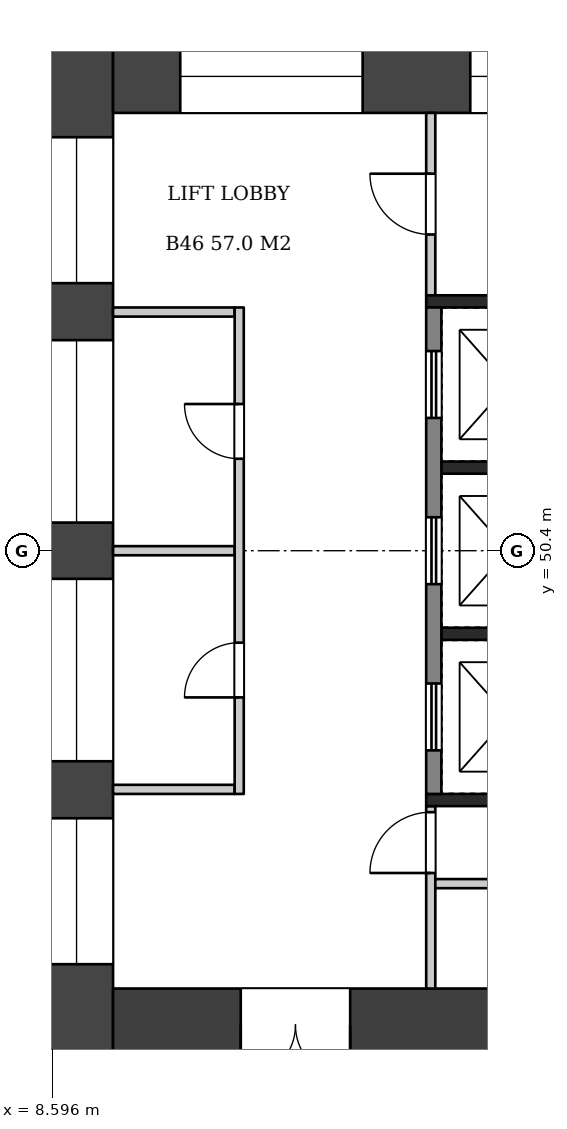
"""IFC4 building model, lengths in metres.
Left out: names, types, materials, properties, quantities, classifications, styles, units other than length and angle.
Written with IfcOpenShell. Run it as: python <this file> out.ifc"""

import sys

from ifc_helpers import new_model, si_unit, direction, frame, frame_2d, origin, place, context, subcontext, project, spatial, rectangle, extrude, element, fill, save


model = new_model("IFC4")
c1 = context("Model", 3, precision=1e-05, world=origin(), true_north=direction((0.0, 1.0)))
c2 = subcontext(c1, "Body", "Model", "MODEL_VIEW")
j1 = project(units=[si_unit("LENGTHUNIT", "METRE"), si_unit("PLANEANGLEUNIT", "RADIAN")], contexts=[c1])
p1 = place(None, origin())
s1 = spatial("IfcSite", under=j1, at=p1, CompositionType="ELEMENT")
p2 = place(p1, origin())
s2 = spatial("IfcBuilding", under=s1, at=p2, CompositionType="ELEMENT")
p3 = place(p2, frame((0.0, 0.0, 179.2)))
s3 = spatial("IfcBuildingStorey", under=s2, at=p3, CompositionType="ELEMENT", Elevation=179.2)
p4 = place(p3, frame((9.0, 58.8, 0.0), z_axis=(0.0, 0.0, 1.0), x_axis=(0.0, -1.0, 0.0)))
e1 = element("IfcWall", 1, at=p4, inside=s3, PredefinedType="SHEAR", context=c2, shape_type="SweptSolid", body=[
    extrude(rectangle(XDim=16.8, YDim=1.2, at=frame_2d((8.4, 0.0))), origin(), (0.0, 0.0, 1.0), 3.22),
])
p5 = place(p4, frame((1.6, 0.0, 0.6)))
e2 = element("IfcOpeningElement", 2, at=p5, cuts=e1, PredefinedType="OPENING", context=c2, shape_type="SweptSolid", body=[
    extrude(rectangle(XDim=2.4, YDim=2.1, at=frame_2d((1.2, 1.05))), frame((0.0, 0.61, 0.0), z_axis=(0.0, -1.0, 0.0), x_axis=(1.0, 0.0, 0.0)), (0.0, 0.0, 1.0), 1.22),
])
p6 = place(p4, frame((4.938, 0.0, 1.6)))
e3 = element("IfcOpeningElement", 3, at=p6, cuts=e1, PredefinedType="OPENING", context=c2, shape_type="SweptSolid", body=[
    extrude(rectangle(XDim=3.0, YDim=1.2, at=frame_2d((1.5, 0.6))), frame((0.0, 0.61, 0.0), z_axis=(0.0, -1.0, 0.0), x_axis=(1.0, 0.0, 0.0)), (0.0, 0.0, 1.0), 1.22),
])
p7 = place(p4, frame((8.863, 0.0, 1.6)))
e4 = element("IfcOpeningElement", 4, at=p7, cuts=e1, PredefinedType="OPENING", context=c2, shape_type="SweptSolid", body=[
    extrude(rectangle(XDim=3.0, YDim=1.2, at=frame_2d((1.5, 0.6))), frame((0.0, 0.61, 0.0), z_axis=(0.0, -1.0, 0.0), x_axis=(1.0, 0.0, 0.0)), (0.0, 0.0, 1.0), 1.22),
])
p8 = place(p4, frame((12.8, 0.0, 0.6)))
e5 = element("IfcOpeningElement", 5, at=p8, cuts=e1, PredefinedType="OPENING", context=c2, shape_type="SweptSolid", body=[
    extrude(rectangle(XDim=2.4, YDim=2.1, at=frame_2d((1.2, 1.05))), frame((0.0, 0.61, 0.0), z_axis=(0.0, -1.0, 0.0), x_axis=(1.0, 0.0, 0.0)), (0.0, 0.0, 1.0), 1.22),
])
p9 = place(p3, frame((9.6, 58.2, 0.0), z_axis=(0.0, 0.0, 1.0), x_axis=(1.0, 0.0, 0.0)))
e6 = element("IfcWall", 6, at=p9, inside=s3, PredefinedType="SHEAR", context=c2, shape_type="SweptSolid", body=[
    extrude(rectangle(XDim=14.4, YDim=1.2, at=frame_2d((7.2, 0.0))), origin(), (0.0, 0.0, 1.0), 3.22),
])
p10 = place(p9, frame((1.105, 0.0, 0.6)))
e7 = element("IfcOpeningElement", 7, at=p10, cuts=e6, PredefinedType="OPENING", context=c2, shape_type="SweptSolid", body=[
    extrude(rectangle(XDim=3.0, YDim=2.1, at=frame_2d((1.5, 1.05))), frame((0.0, 0.61, 0.0), z_axis=(0.0, -1.0, 0.0), x_axis=(1.0, 0.0, 0.0)), (0.0, 0.0, 1.0), 1.22),
])
p11 = place(p9, frame((5.875, 0.0, 0.6)))
e8 = element("IfcOpeningElement", 8, at=p11, cuts=e6, PredefinedType="OPENING", context=c2, shape_type="SweptSolid", body=[
    extrude(rectangle(XDim=2.4, YDim=2.1, at=frame_2d((1.2, 1.05))), frame((0.0, 0.61, 0.0), z_axis=(0.0, -1.0, 0.0), x_axis=(1.0, 0.0, 0.0)), (0.0, 0.0, 1.0), 1.22),
])
p12 = place(p9, frame((9.993, 0.0, 0.5)))
e9 = element("IfcOpeningElement", 9, at=p12, cuts=e6, PredefinedType="OPENING", context=c2, shape_type="SweptSolid", body=[
    extrude(rectangle(XDim=1.2, YDim=2.4, at=frame_2d((0.6, 1.2))), frame((0.0, 0.61, 0.0), z_axis=(0.0, -1.0, 0.0), x_axis=(1.0, 0.0, 0.0)), (0.0, 0.0, 1.0), 1.22),
])
p13 = place(p9, frame((12.197, 0.0, 0.5)))
e10 = element("IfcOpeningElement", 10, at=p13, cuts=e6, PredefinedType="OPENING", context=c2, shape_type="SweptSolid", body=[
    extrude(rectangle(XDim=1.2, YDim=2.4, at=frame_2d((0.6, 1.2))), frame((0.0, 0.61, 0.0), z_axis=(0.0, -1.0, 0.0), x_axis=(1.0, 0.0, 0.0)), (0.0, 0.0, 1.0), 1.22),
])
p14 = place(p3, frame((9.6, 42.6, 0.0), z_axis=(0.0, 0.0, 1.0), x_axis=(1.0, 0.0, 0.0)))
e11 = element("IfcWall", 11, at=p14, inside=s3, PredefinedType="SHEAR", context=c2, shape_type="SweptSolid", body=[
    extrude(rectangle(XDim=14.4, YDim=1.2, at=frame_2d((7.2, 0.0))), origin(), (0.0, 0.0, 1.0), 3.22),
])
p15 = place(p14, frame((2.1, 0.0, 0.0)))
e12 = element("IfcOpeningElement", 12, at=p15, cuts=e11, PredefinedType="OPENING", context=c2, shape_type="SweptSolid", body=[
    extrude(rectangle(XDim=1.8, YDim=2.1, at=frame_2d((0.9, 1.05))), frame((0.0, 0.61, 0.0), z_axis=(0.0, -1.0, 0.0), x_axis=(1.0, 0.0, 0.0)), (0.0, 0.0, 1.0), 1.22),
])
for number, where, z_axis, x_axis in (
    (13, (9.6, 54.325, 0.0), (0.0, 0.0, 1.0), (1.0, 0.0, 0.0)),
    (14, (9.6, 46.475, 0.0), (0.0, 0.0, 1.0), (1.0, 0.0, 0.0)),
    (15, (9.6, 50.4, 0.0), (0.0, 0.0, 1.0), (1.0, 0.0, 0.0)),
):
    element("IfcWall", number, at=place(p3, frame(where, z_axis=z_axis, x_axis=x_axis)), inside=s3, PredefinedType="PARTITIONING", context=c2, shape_type="SweptSolid", body=[
        extrude(rectangle(XDim=2.0, YDim=0.15, at=frame_2d((1.0, 0.0))), origin(), (0.0, 0.0, 1.0), 3.22),
    ])
p16 = place(p3, frame((11.675, 54.4, 0.0), z_axis=(0.0, 0.0, 1.0), x_axis=(0.0, -1.0, 0.0)))
e16 = element("IfcWall", 16, at=p16, inside=s3, PredefinedType="PARTITIONING", context=c2, shape_type="SweptSolid", body=[
    extrude(rectangle(XDim=8.0, YDim=0.15, at=frame_2d((4.0, 0.0))), origin(), (0.0, 0.0, 1.0), 3.22),
])
p17 = place(p16, frame((1.587, 0.0, 0.0)))
e17 = element("IfcOpeningElement", 17, at=p17, cuts=e16, PredefinedType="OPENING", context=c2, shape_type="SweptSolid", body=[
    extrude(rectangle(XDim=0.9, YDim=2.1, at=frame_2d((0.45, 1.05))), frame((0.0, 0.085, 0.0), z_axis=(0.0, -1.0, 0.0), x_axis=(1.0, 0.0, 0.0)), (0.0, 0.0, 1.0), 0.17),
])
p18 = place(p16, frame((5.512, 0.0, 0.0)))
e18 = element("IfcOpeningElement", 18, at=p18, cuts=e16, PredefinedType="OPENING", context=c2, shape_type="SweptSolid", body=[
    extrude(rectangle(XDim=0.9, YDim=2.1, at=frame_2d((0.45, 1.05))), frame((0.0, 0.085, 0.0), z_axis=(0.0, -1.0, 0.0), x_axis=(1.0, 0.0, 0.0)), (0.0, 0.0, 1.0), 0.17),
])
for number, where, z_axis, x_axis in (
    (19, (15.0, 51.767, 0.0), (0.0, 0.0, 1.0), (1.0, 0.0, 0.0)),
    (20, (15.0, 49.033, 0.0), (0.0, 0.0, 1.0), (1.0, 0.0, 0.0)),
):
    element("IfcWall", number, at=place(p3, frame(where, z_axis=z_axis, x_axis=x_axis)), inside=s3, PredefinedType="SHEAR", context=c2, shape_type="SweptSolid", body=[
        extrude(rectangle(XDim=1.9, YDim=0.2, at=frame_2d((0.95, 0.0))), origin(), (0.0, 0.0, 1.0), 3.22),
    ])
p19 = place(p3, frame((14.875, 54.4, 0.0), z_axis=(0.0, 0.0, 1.0), x_axis=(0.0, -1.0, 0.0)))
e21 = element("IfcWall", 21, at=p19, inside=s3, PredefinedType="SHEAR", context=c2, shape_type="SweptSolid", body=[
    extrude(rectangle(XDim=8.0, YDim=0.25, at=frame_2d((4.0, 0.0))), origin(), (0.0, 0.0, 1.0), 3.22),
])
p20 = place(p19, frame((0.717, 0.0, 0.0)))
e22 = element("IfcOpeningElement", 22, at=p20, cuts=e21, PredefinedType="OPENING", context=c2, shape_type="SweptSolid", body=[
    extrude(rectangle(XDim=1.1, YDim=2.1, at=frame_2d((0.55, 1.05))), frame((0.0, 0.135, 0.0), z_axis=(0.0, -1.0, 0.0), x_axis=(1.0, 0.0, 0.0)), (0.0, 0.0, 1.0), 0.27),
])
p21 = place(p19, frame((3.45, 0.0, 0.0)))
e23 = element("IfcOpeningElement", 23, at=p21, cuts=e21, PredefinedType="OPENING", context=c2, shape_type="SweptSolid", body=[
    extrude(rectangle(XDim=1.1, YDim=2.1, at=frame_2d((0.55, 1.05))), frame((0.0, 0.135, 0.0), z_axis=(0.0, -1.0, 0.0), x_axis=(1.0, 0.0, 0.0)), (0.0, 0.0, 1.0), 0.27),
])
p22 = place(p19, frame((6.183, 0.0, 0.0)))
e24 = element("IfcOpeningElement", 24, at=p22, cuts=e21, PredefinedType="OPENING", context=c2, shape_type="SweptSolid", body=[
    extrude(rectangle(XDim=1.1, YDim=2.1, at=frame_2d((0.55, 1.05))), frame((0.0, 0.135, 0.0), z_axis=(0.0, -1.0, 0.0), x_axis=(1.0, 0.0, 0.0)), (0.0, 0.0, 1.0), 0.27),
])
p23 = place(p3, frame((14.75, 54.5, 0.0), z_axis=(0.0, 0.0, 1.0), x_axis=(1.0, 0.0, 0.0)))
e25 = element("IfcWall", 25, at=p23, inside=s3, PredefinedType="SHEAR", context=c2, shape_type="SweptSolid", body=[
    extrude(rectangle(XDim=2.4, YDim=0.2, at=frame_2d((1.2, 0.0))), origin(), (0.0, 0.0, 1.0), 3.22),
])
p24 = place(p3, frame((14.825, 57.6, 0.0), z_axis=(0.0, 0.0, 1.0), x_axis=(0.0, -1.0, 0.0)))
e26 = element("IfcWall", 26, at=p24, inside=s3, PredefinedType="PARTITIONING", context=c2, shape_type="SweptSolid", body=[
    extrude(rectangle(XDim=3.0, YDim=0.15, at=frame_2d((1.5, 0.0))), origin(), (0.0, 0.0, 1.0), 3.22),
])
p25 = place(p24, frame((1.0, 0.0, 0.0)))
e27 = element("IfcOpeningElement", 27, at=p25, cuts=e26, PredefinedType="OPENING", context=c2, shape_type="SweptSolid", body=[
    extrude(rectangle(XDim=1.0, YDim=2.1, at=frame_2d((0.5, 1.05))), frame((0.0, 0.085, 0.0), z_axis=(0.0, -1.0, 0.0), x_axis=(1.0, 0.0, 0.0)), (0.0, 0.0, 1.0), 0.17),
])
p26 = place(p3, frame((14.75, 46.3, 0.0), z_axis=(0.0, 0.0, 1.0), x_axis=(1.0, 0.0, 0.0)))
e28 = element("IfcWall", 28, at=p26, inside=s3, PredefinedType="SHEAR", context=c2, shape_type="SweptSolid", body=[
    extrude(rectangle(XDim=9.25, YDim=0.2, at=frame_2d((4.625, 0.0))), origin(), (0.0, 0.0, 1.0), 3.22),
])
p27 = place(p3, frame((14.825, 46.2, 0.0), z_axis=(0.0, 0.0, 1.0), x_axis=(0.0, -1.0, 0.0)))
e29 = element("IfcWall", 29, at=p27, inside=s3, PredefinedType="PARTITIONING", context=c2, shape_type="SweptSolid", body=[
    extrude(rectangle(XDim=3.0, YDim=0.15, at=frame_2d((1.5, 0.0))), origin(), (0.0, 0.0, 1.0), 3.22),
])
p28 = place(p27, frame((0.1, 0.0, 0.0)))
e30 = element("IfcOpeningElement", 30, at=p28, cuts=e29, PredefinedType="OPENING", context=c2, shape_type="SweptSolid", body=[
    extrude(rectangle(XDim=1.0, YDim=2.1, at=frame_2d((0.5, 1.05))), frame((0.0, 0.085, 0.0), z_axis=(0.0, -1.0, 0.0), x_axis=(1.0, 0.0, 0.0)), (0.0, 0.0, 1.0), 0.17),
])
p29 = place(p3, frame((14.9, 44.925, 0.0), z_axis=(0.0, 0.0, 1.0), x_axis=(1.0, 0.0, 0.0)))
e31 = element("IfcWall", 31, at=p29, inside=s3, PredefinedType="PARTITIONING", context=c2, shape_type="SweptSolid", body=[
    extrude(rectangle(XDim=9.1, YDim=0.15, at=frame_2d((4.55, 0.0))), origin(), (0.0, 0.0, 1.0), 3.22),
])
p30 = place(p29, frame((1.738, 0.0, 0.0)))
e32 = element("IfcOpeningElement", 32, at=p30, cuts=e31, PredefinedType="OPENING", context=c2, shape_type="SweptSolid", body=[
    extrude(rectangle(XDim=1.0, YDim=2.1, at=frame_2d((0.5, 1.05))), frame((0.0, 0.085, 0.0), z_axis=(0.0, -1.0, 0.0), x_axis=(1.0, 0.0, 0.0)), (0.0, 0.0, 1.0), 0.17),
])
p31 = place(p29, frame((6.413, 0.0, 0.0)))
e33 = element("IfcOpeningElement", 33, at=p31, cuts=e31, PredefinedType="OPENING", context=c2, shape_type="SweptSolid", body=[
    extrude(rectangle(XDim=0.9, YDim=2.1, at=frame_2d((0.45, 1.05))), frame((0.0, 0.085, 0.0), z_axis=(0.0, -1.0, 0.0), x_axis=(1.0, 0.0, 0.0)), (0.0, 0.0, 1.0), 0.17),
])
p32 = place(p15, frame((1.8, 0.0, 0.0), z_axis=(0.0, 0.0, 1.0), x_axis=(-1.0, 0.0, 0.0)))
e34 = element("IfcDoor", 34, at=p32, inside=s3, OperationType="DOUBLE_DOOR_SINGLE_SWING", PredefinedType="DOOR", context=c2, shape_type="SweptSolid", body=[
    extrude(rectangle(XDim=1.8, YDim=2.1, at=frame_2d((0.9, 1.05))), frame((0.0, 0.025, 0.0), z_axis=(0.0, -1.0, 0.0), x_axis=(1.0, 0.0, 0.0)), (0.0, 0.0, 1.0), 0.05),
])
fill(e12, e34)
p33 = place(p17, frame((0.9, 0.0, 0.0), z_axis=(0.0, 0.0, 1.0), x_axis=(-1.0, 0.0, 0.0)))
e35 = element("IfcDoor", 35, at=p33, inside=s3, OperationType="SINGLE_SWING_RIGHT", PredefinedType="DOOR", context=c2, shape_type="SweptSolid", body=[
    extrude(rectangle(XDim=0.9, YDim=2.1, at=frame_2d((0.45, 1.05))), frame((0.0, 0.025, 0.0), z_axis=(0.0, -1.0, 0.0), x_axis=(1.0, 0.0, 0.0)), (0.0, 0.0, 1.0), 0.05),
])
fill(e17, e35)
p34 = place(p18, frame((0.9, 0.0, 0.0), z_axis=(0.0, 0.0, 1.0), x_axis=(-1.0, 0.0, 0.0)))
e36 = element("IfcDoor", 36, at=p34, inside=s3, OperationType="SINGLE_SWING_LEFT", PredefinedType="DOOR", context=c2, shape_type="SweptSolid", body=[
    extrude(rectangle(XDim=0.9, YDim=2.1, at=frame_2d((0.45, 1.05))), frame((0.0, 0.025, 0.0), z_axis=(0.0, -1.0, 0.0), x_axis=(1.0, 0.0, 0.0)), (0.0, 0.0, 1.0), 0.05),
])
fill(e18, e36)
p35 = place(p20, origin())
e37 = element("IfcDoor", 37, at=p35, inside=s3, OperationType="DOUBLE_DOOR_SLIDING", PredefinedType="DOOR", context=c2, shape_type="SweptSolid", body=[
    extrude(rectangle(XDim=1.1, YDim=2.1, at=frame_2d((0.55, 1.05))), frame((0.0, 0.025, 0.0), z_axis=(0.0, -1.0, 0.0), x_axis=(1.0, 0.0, 0.0)), (0.0, 0.0, 1.0), 0.05),
])
fill(e22, e37)
p36 = place(p21, origin())
e38 = element("IfcDoor", 38, at=p36, inside=s3, OperationType="DOUBLE_DOOR_SLIDING", PredefinedType="DOOR", context=c2, shape_type="SweptSolid", body=[
    extrude(rectangle(XDim=1.1, YDim=2.1, at=frame_2d((0.55, 1.05))), frame((0.0, 0.025, 0.0), z_axis=(0.0, -1.0, 0.0), x_axis=(1.0, 0.0, 0.0)), (0.0, 0.0, 1.0), 0.05),
])
fill(e23, e38)
p37 = place(p22, origin())
e39 = element("IfcDoor", 39, at=p37, inside=s3, OperationType="DOUBLE_DOOR_SLIDING", PredefinedType="DOOR", context=c2, shape_type="SweptSolid", body=[
    extrude(rectangle(XDim=1.1, YDim=2.1, at=frame_2d((0.55, 1.05))), frame((0.0, 0.025, 0.0), z_axis=(0.0, -1.0, 0.0), x_axis=(1.0, 0.0, 0.0)), (0.0, 0.0, 1.0), 0.05),
])
fill(e24, e39)
p38 = place(p25, frame((1.0, 0.0, 0.0), z_axis=(0.0, 0.0, 1.0), x_axis=(-1.0, 0.0, 0.0)))
e40 = element("IfcDoor", 40, at=p38, inside=s3, OperationType="SINGLE_SWING_RIGHT", PredefinedType="DOOR", context=c2, shape_type="SweptSolid", body=[
    extrude(rectangle(XDim=1.0, YDim=2.1, at=frame_2d((0.5, 1.05))), frame((0.0, 0.025, 0.0), z_axis=(0.0, -1.0, 0.0), x_axis=(1.0, 0.0, 0.0)), (0.0, 0.0, 1.0), 0.05),
])
fill(e27, e40)
p39 = place(p28, frame((1.0, 0.0, 0.0), z_axis=(0.0, 0.0, 1.0), x_axis=(-1.0, 0.0, 0.0)))
e41 = element("IfcDoor", 41, at=p39, inside=s3, OperationType="SINGLE_SWING_LEFT", PredefinedType="DOOR", context=c2, shape_type="SweptSolid", body=[
    extrude(rectangle(XDim=1.0, YDim=2.1, at=frame_2d((0.5, 1.05))), frame((0.0, 0.025, 0.0), z_axis=(0.0, -1.0, 0.0), x_axis=(1.0, 0.0, 0.0)), (0.0, 0.0, 1.0), 0.05),
])
fill(e30, e41)
p40 = place(p5, origin())
e42 = element("IfcWindow", 42, at=p40, inside=s3, PartitioningType="SINGLE_PANEL", PredefinedType="WINDOW", context=c2, shape_type="SweptSolid", body=[
    extrude(rectangle(XDim=2.4, YDim=2.1, at=frame_2d((1.2, 1.05))), frame((0.0, 0.03, 0.0), z_axis=(0.0, -1.0, 0.0), x_axis=(1.0, 0.0, 0.0)), (0.0, 0.0, 1.0), 0.06),
])
fill(e2, e42)
p41 = place(p6, origin())
e43 = element("IfcWindow", 43, at=p41, inside=s3, PartitioningType="SINGLE_PANEL", PredefinedType="WINDOW", context=c2, shape_type="SweptSolid", body=[
    extrude(rectangle(XDim=3.0, YDim=1.2, at=frame_2d((1.5, 0.6))), frame((0.0, 0.03, 0.0), z_axis=(0.0, -1.0, 0.0), x_axis=(1.0, 0.0, 0.0)), (0.0, 0.0, 1.0), 0.06),
])
fill(e3, e43)
p42 = place(p7, origin())
e44 = element("IfcWindow", 44, at=p42, inside=s3, PartitioningType="SINGLE_PANEL", PredefinedType="WINDOW", context=c2, shape_type="SweptSolid", body=[
    extrude(rectangle(XDim=3.0, YDim=1.2, at=frame_2d((1.5, 0.6))), frame((0.0, 0.03, 0.0), z_axis=(0.0, -1.0, 0.0), x_axis=(1.0, 0.0, 0.0)), (0.0, 0.0, 1.0), 0.06),
])
fill(e4, e44)
p43 = place(p8, origin())
e45 = element("IfcWindow", 45, at=p43, inside=s3, PartitioningType="SINGLE_PANEL", PredefinedType="WINDOW", context=c2, shape_type="SweptSolid", body=[
    extrude(rectangle(XDim=2.4, YDim=2.1, at=frame_2d((1.2, 1.05))), frame((0.0, 0.03, 0.0), z_axis=(0.0, -1.0, 0.0), x_axis=(1.0, 0.0, 0.0)), (0.0, 0.0, 1.0), 0.06),
])
fill(e5, e45)
p44 = place(p10, origin())
e46 = element("IfcWindow", 46, at=p44, inside=s3, PartitioningType="SINGLE_PANEL", PredefinedType="WINDOW", context=c2, shape_type="SweptSolid", body=[
    extrude(rectangle(XDim=3.0, YDim=2.1, at=frame_2d((1.5, 1.05))), frame((0.0, 0.03, 0.0), z_axis=(0.0, -1.0, 0.0), x_axis=(1.0, 0.0, 0.0)), (0.0, 0.0, 1.0), 0.06),
])
fill(e7, e46)
p45 = place(p11, origin())
e47 = element("IfcWindow", 47, at=p45, inside=s3, PartitioningType="SINGLE_PANEL", PredefinedType="WINDOW", context=c2, shape_type="SweptSolid", body=[
    extrude(rectangle(XDim=2.4, YDim=2.1, at=frame_2d((1.2, 1.05))), frame((0.0, 0.03, 0.0), z_axis=(0.0, -1.0, 0.0), x_axis=(1.0, 0.0, 0.0)), (0.0, 0.0, 1.0), 0.06),
])
fill(e8, e47)
save(model, sys.argv[1])
